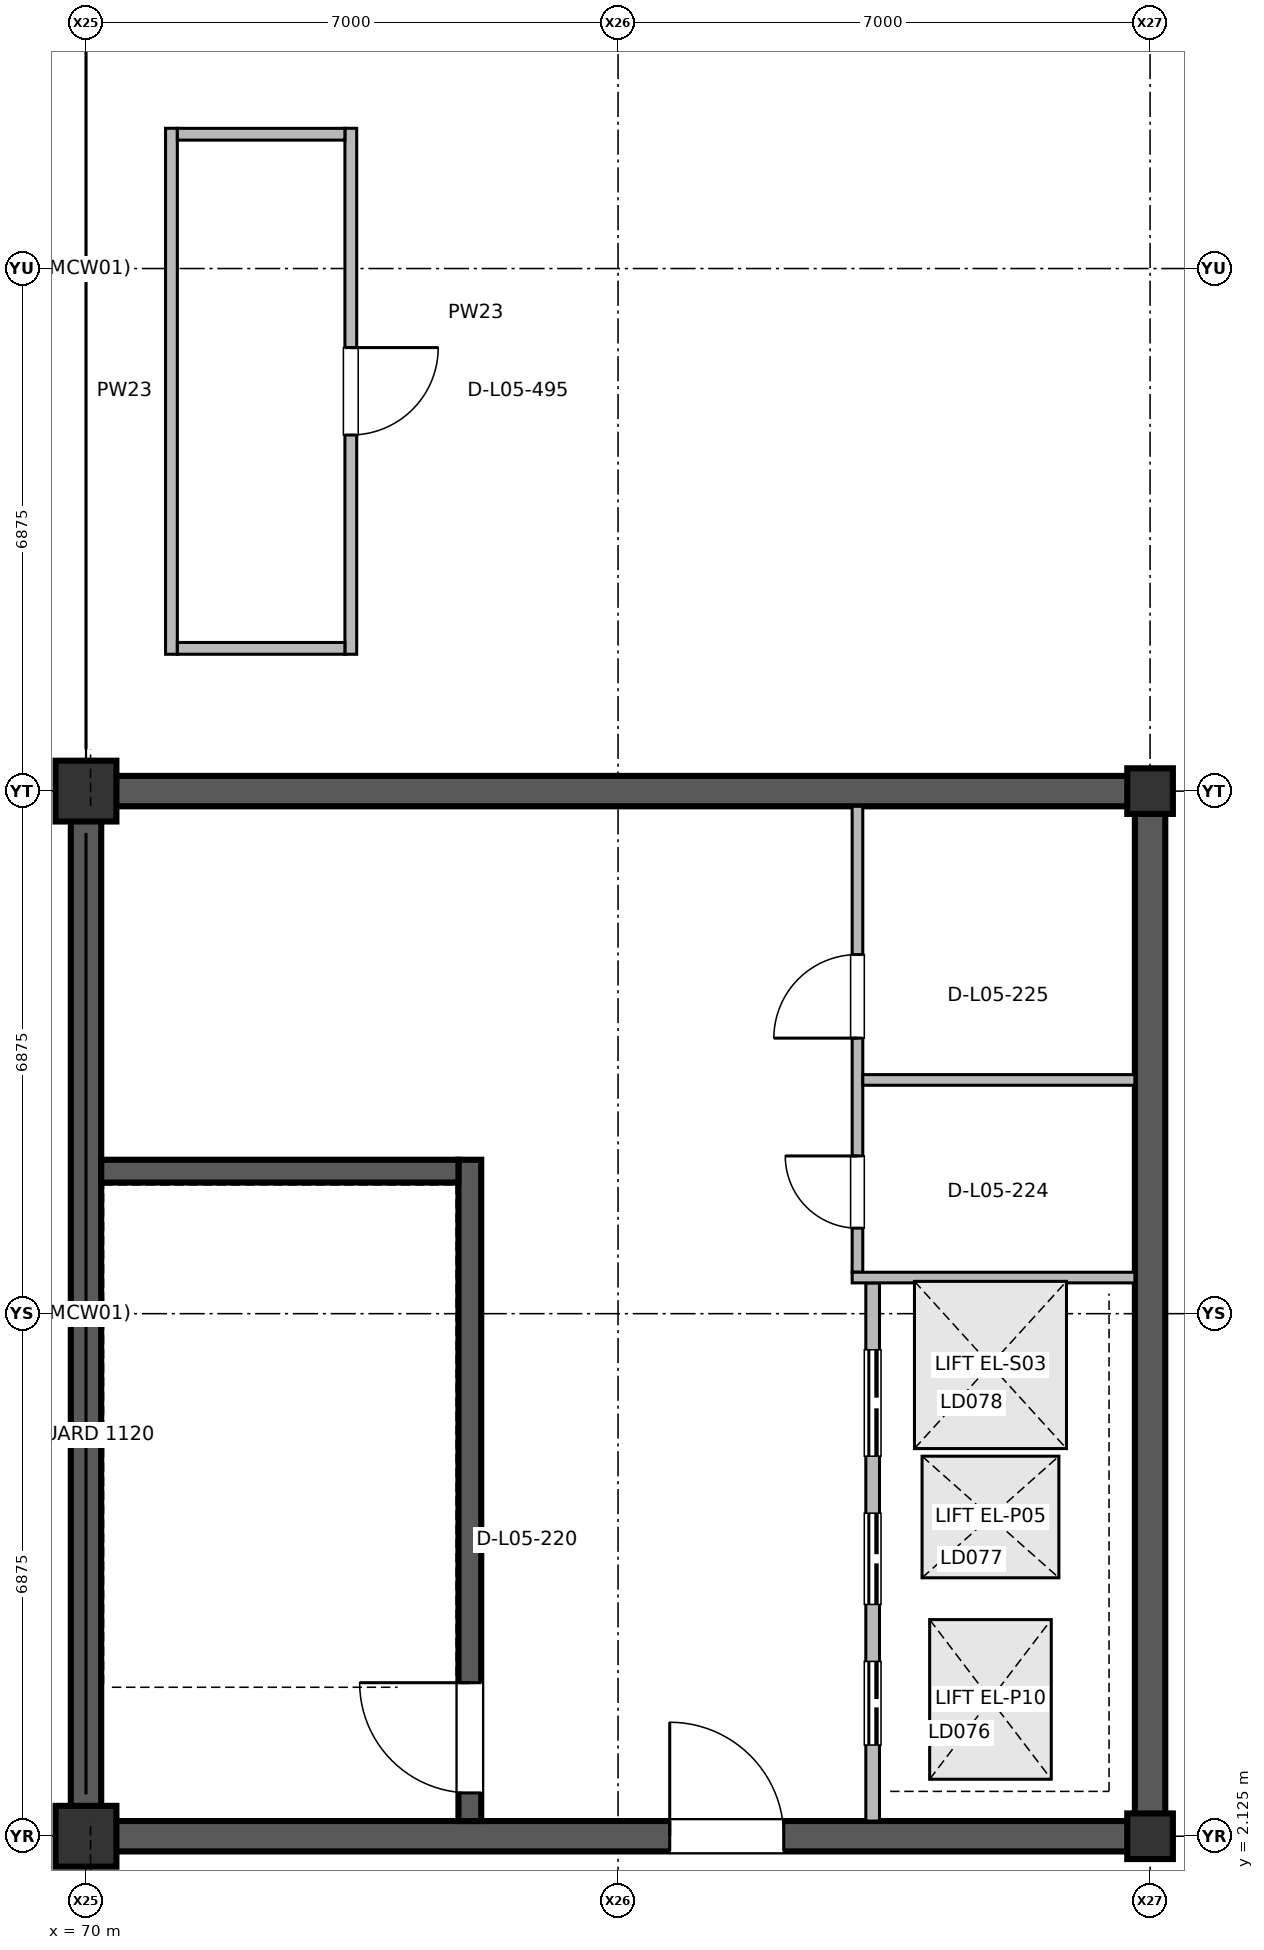
"""IFC4 building model, lengths in metres.
Left out: names, types, materials, properties, quantities, classifications, styles, units other than length and angle.
Written with IfcOpenShell. Run it as: python <this file> out.ifc"""

import sys

from ifc_helpers import new_model, si_unit, direction, frame, frame_2d, origin, origin_2d, place, context, subcontext, project, spatial, rectangle, extrude, element, fill, save


model = new_model("IFC4")
c1 = context("Model", 3, precision=1e-05, world=origin(), true_north=direction((0.0, 1.0)))
c2 = subcontext(c1, "Body", "Model", "MODEL_VIEW")
j1 = project(units=[si_unit("LENGTHUNIT", "METRE"), si_unit("PLANEANGLEUNIT", "RADIAN")], contexts=[c1])
p1 = place(None, origin())
s1 = spatial("IfcSite", under=j1, at=p1, CompositionType="ELEMENT")
p2 = place(p1, origin())
s2 = spatial("IfcBuilding", under=s1, at=p2, CompositionType="ELEMENT")
p3 = place(p2, frame((0.0, 0.0, 21.0)))
s3 = spatial("IfcBuildingStorey", under=s2, at=p3, CompositionType="ELEMENT", Elevation=21.0)
for number, where, z_axis, x_axis in (
    (1, (70.0, 2.125, 0.0), (0.0, 0.0, 1.0), (1.0, 0.0, 0.0)),
    (2, (70.0, 15.875, 0.0), (0.0, 0.0, 1.0), (1.0, 0.0, 0.0)),
):
    element("IfcColumn", number, at=place(p3, frame(where, z_axis=z_axis, x_axis=x_axis)), inside=s3, PredefinedType="COLUMN", context=c2, shape_type="SweptSolid", body=[
        extrude(rectangle(XDim=0.8, YDim=0.8, at=origin_2d()), origin(), (0.0, 0.0, 1.0), 5.185),
    ])
for number, where, z_axis, x_axis in (
    (3, (84.0, 2.125, 0.0), (0.0, 0.0, 1.0), (1.0, 0.0, 0.0)),
    (4, (84.0, 15.875, 0.0), (0.0, 0.0, 1.0), (1.0, 0.0, 0.0)),
):
    element("IfcColumn", number, at=place(p3, frame(where, z_axis=z_axis, x_axis=x_axis)), inside=s3, PredefinedType="COLUMN", context=c2, shape_type="SweptSolid", body=[
        extrude(rectangle(XDim=0.6, YDim=0.6, at=origin_2d()), origin(), (0.0, 0.0, 1.0), 5.185),
    ])
for number, where, z_axis, x_axis in (
    (5, (70.0, 2.325, 0.0), (0.0, 0.0, 1.0), (0.0, 1.0, 0.0)),
    (6, (84.0, 2.325, 0.0), (0.0, 0.0, 1.0), (0.0, 1.0, 0.0)),
):
    element("IfcWall", number, at=place(p3, frame(where, z_axis=z_axis, x_axis=x_axis)), inside=s3, PredefinedType="SHEAR", context=c2, shape_type="SweptSolid", body=[
        extrude(rectangle(XDim=13.35, YDim=0.4, at=frame_2d((6.675, 0.0))), origin(), (0.0, 0.0, 1.0), 5.185),
    ])
p4 = place(p3, frame((70.2, 2.125, 0.0), z_axis=(0.0, 0.0, 1.0), x_axis=(1.0, 0.0, 0.0)))
e7 = element("IfcWall", 7, at=p4, inside=s3, PredefinedType="SHEAR", context=c2, shape_type="SweptSolid", body=[
    extrude(rectangle(XDim=13.6, YDim=0.4, at=frame_2d((6.8, 0.0))), origin(), (0.0, 0.0, 1.0), 5.185),
])
p5 = place(p4, frame((7.48, 0.0, 0.0)))
e8 = element("IfcOpeningElement", 8, at=p5, cuts=e7, PredefinedType="OPENING", context=c2, shape_type="SweptSolid", body=[
    extrude(rectangle(XDim=1.5, YDim=2.2, at=frame_2d((0.75, 1.1))), frame((0.0, 0.21, 0.0), z_axis=(0.0, -1.0, 0.0), x_axis=(1.0, 0.0, 0.0)), (0.0, 0.0, 1.0), 0.42),
])
p6 = place(p3, frame((70.2, 15.875, 0.0), z_axis=(0.0, 0.0, 1.0), x_axis=(1.0, 0.0, 0.0)))
e9 = element("IfcWall", 9, at=p6, inside=s3, PredefinedType="SHEAR", context=c2, shape_type="SweptSolid", body=[
    extrude(rectangle(XDim=13.6, YDim=0.4, at=frame_2d((6.8, 0.0))), origin(), (0.0, 0.0, 1.0), 5.185),
])
p7 = place(p3, frame((75.05, 2.325, 0.0), z_axis=(0.0, 0.0, 1.0), x_axis=(0.0, 1.0, 0.0)))
e10 = element("IfcWall", 10, at=p7, inside=s3, PredefinedType="SHEAR", context=c2, shape_type="SweptSolid", body=[
    extrude(rectangle(XDim=8.7, YDim=0.3, at=frame_2d((4.35, 0.0))), origin(), (0.0, 0.0, 1.0), 5.185),
])
p8 = place(p7, frame((0.37, 0.0, 0.0)))
e11 = element("IfcOpeningElement", 11, at=p8, cuts=e10, PredefinedType="OPENING", context=c2, shape_type="SweptSolid", body=[
    extrude(rectangle(XDim=1.45, YDim=2.2, at=frame_2d((0.725, 1.1))), frame((0.0, 0.16, 0.0), z_axis=(0.0, -1.0, 0.0), x_axis=(1.0, 0.0, 0.0)), (0.0, 0.0, 1.0), 0.32),
])
p9 = place(p3, frame((80.35, 2.325, 0.0), z_axis=(0.0, 0.0, 1.0), x_axis=(0.0, 1.0, 0.0)))
e12 = element("IfcWall", 12, at=p9, inside=s3, PredefinedType="PARTITIONING", context=c2, shape_type="SweptSolid", body=[
    extrude(rectangle(XDim=7.08, YDim=0.18, at=frame_2d((3.54, 0.0))), origin(), (0.0, 0.0, 1.0), 4.42),
])
p10 = place(p9, frame((1.0, 0.0, 0.0)))
e13 = element("IfcOpeningElement", 13, at=p10, cuts=e12, PredefinedType="OPENING", context=c2, shape_type="SweptSolid", body=[
    extrude(rectangle(XDim=1.1, YDim=2.2, at=frame_2d((0.55, 1.1))), frame((0.0, 0.1, 0.0), z_axis=(0.0, -1.0, 0.0), x_axis=(1.0, 0.0, 0.0)), (0.0, 0.0, 1.0), 0.2),
])
p11 = place(p9, frame((2.85, 0.0, 0.0)))
e14 = element("IfcOpeningElement", 14, at=p11, cuts=e12, PredefinedType="OPENING", context=c2, shape_type="SweptSolid", body=[
    extrude(rectangle(XDim=1.2, YDim=2.25, at=frame_2d((0.6, 1.125))), frame((0.0, 0.1, 0.0), z_axis=(0.0, -1.0, 0.0), x_axis=(1.0, 0.0, 0.0)), (0.0, 0.0, 1.0), 0.2),
])
p12 = place(p9, frame((4.8, 0.0, 0.0)))
e15 = element("IfcOpeningElement", 15, at=p12, cuts=e12, PredefinedType="OPENING", context=c2, shape_type="SweptSolid", body=[
    extrude(rectangle(XDim=1.4, YDim=2.3, at=frame_2d((0.7, 1.15))), frame((0.0, 0.1, 0.0), z_axis=(0.0, -1.0, 0.0), x_axis=(1.0, 0.0, 0.0)), (0.0, 0.0, 1.0), 0.2),
])
p13 = place(p3, frame((80.15, 9.545, 0.0), z_axis=(0.0, 0.0, 1.0), x_axis=(0.0, 1.0, 0.0)))
e16 = element("IfcWall", 16, at=p13, inside=s3, PredefinedType="PARTITIONING", context=c2, shape_type="SweptSolid", body=[
    extrude(rectangle(XDim=6.13, YDim=0.14, at=frame_2d((3.065, 0.0))), origin(), (0.0, 0.0, 1.0), 4.42),
])
p14 = place(p13, frame((0.58, 0.0, 0.0)))
e17 = element("IfcOpeningElement", 17, at=p14, cuts=e16, PredefinedType="OPENING", context=c2, shape_type="SweptSolid", body=[
    extrude(rectangle(XDim=0.95, YDim=2.15, at=frame_2d((0.475, 1.075))), frame((0.0, 0.08, 0.0), z_axis=(0.0, -1.0, 0.0), x_axis=(1.0, 0.0, 0.0)), (0.0, 0.0, 1.0), 0.16),
])
p15 = place(p13, frame((3.08, 0.0, 0.0)))
e18 = element("IfcOpeningElement", 18, at=p15, cuts=e16, PredefinedType="OPENING", context=c2, shape_type="SweptSolid", body=[
    extrude(rectangle(XDim=1.1, YDim=2.15, at=frame_2d((0.55, 1.075))), frame((0.0, 0.08, 0.0), z_axis=(0.0, -1.0, 0.0), x_axis=(1.0, 0.0, 0.0)), (0.0, 0.0, 1.0), 0.16),
])
p16 = place(p3, frame((73.484, 24.595, 0.0), z_axis=(0.0, 0.0, 1.0), x_axis=(0.0, -1.0, 0.0)))
e19 = element("IfcWall", 19, at=p16, inside=s3, PredefinedType="PARTITIONING", context=c2, shape_type="SweptSolid", body=[
    extrude(rectangle(XDim=6.92, YDim=0.155, at=frame_2d((3.46, 0.0))), origin(), (0.0, 0.0, 1.0), 4.42),
])
p17 = place(p16, frame((2.885, 0.0, 0.0)))
e20 = element("IfcOpeningElement", 20, at=p17, cuts=e19, PredefinedType="OPENING", context=c2, shape_type="SweptSolid", body=[
    extrude(rectangle(XDim=1.15, YDim=2.2, at=frame_2d((0.575, 1.1))), frame((0.0, 0.087, 0.0), z_axis=(0.0, -1.0, 0.0), x_axis=(1.0, 0.0, 0.0)), (0.0, 0.0, 1.0), 0.175),
])
p18 = place(p3, frame((80.08, 9.475, 0.0), z_axis=(0.0, 0.0, 1.0), x_axis=(1.0, 0.0, 0.0)))
e21 = element("IfcWall", 21, at=p18, inside=s3, PredefinedType="PARTITIONING", context=c2, shape_type="SweptSolid", body=[
    extrude(rectangle(XDim=3.72, YDim=0.14, at=frame_2d((1.86, 0.0))), origin(), (0.0, 0.0, 1.0), 4.42),
])
p19 = place(p3, frame((80.22, 12.075, 0.0), z_axis=(0.0, 0.0, 1.0), x_axis=(1.0, 0.0, 0.0)))
e22 = element("IfcWall", 22, at=p19, inside=s3, PredefinedType="PARTITIONING", context=c2, shape_type="SweptSolid", body=[
    extrude(rectangle(XDim=3.58, YDim=0.14, at=frame_2d((1.79, 0.0))), origin(), (0.0, 0.0, 1.0), 4.42),
])
p20 = place(p3, frame((71.124, 17.675, 0.0), z_axis=(0.0, 0.0, 1.0), x_axis=(0.0, 1.0, 0.0)))
e23 = element("IfcWall", 23, at=p20, inside=s3, PredefinedType="PARTITIONING", context=c2, shape_type="SweptSolid", body=[
    extrude(rectangle(XDim=6.92, YDim=0.155, at=frame_2d((3.46, 0.0))), origin(), (0.0, 0.0, 1.0), 4.42),
])
for number, where, z_axis, x_axis in (
    (24, (71.202, 17.753, 0.0), (0.0, 0.0, 1.0), (1.0, 0.0, 0.0)),
    (25, (71.202, 24.517, 0.0), (0.0, 0.0, 1.0), (1.0, 0.0, 0.0)),
):
    element("IfcWall", number, at=place(p3, frame(where, z_axis=z_axis, x_axis=x_axis)), inside=s3, PredefinedType="PARTITIONING", context=c2, shape_type="SweptSolid", body=[
        extrude(rectangle(XDim=2.204, YDim=0.155, at=frame_2d((1.102, 0.0))), origin(), (0.0, 0.0, 1.0), 4.42),
    ])
p21 = place(p3, frame((70.2, 10.875, 0.0), z_axis=(0.0, 0.0, 1.0), x_axis=(1.0, 0.0, 0.0)))
e26 = element("IfcWall", 26, at=p21, inside=s3, PredefinedType="SHEAR", context=c2, shape_type="SweptSolid", body=[
    extrude(rectangle(XDim=4.7, YDim=0.3, at=frame_2d((2.35, 0.0))), origin(), (0.0, 0.0, 1.0), 5.185),
])
p22 = place(p5, origin())
e27 = element("IfcDoor", 27, at=p22, inside=s3, OperationType="SINGLE_SWING_LEFT", PredefinedType="DOOR", context=c2, shape_type="SweptSolid", body=[
    extrude(rectangle(XDim=1.5, YDim=2.2, at=frame_2d((0.75, 1.1))), frame((0.0, 0.025, 0.0), z_axis=(0.0, -1.0, 0.0), x_axis=(1.0, 0.0, 0.0)), (0.0, 0.0, 1.0), 0.05),
])
fill(e8, e27)
p23 = place(p8, origin())
e28 = element("IfcDoor", 28, at=p23, inside=s3, OperationType="SINGLE_SWING_RIGHT", PredefinedType="DOOR", context=c2, shape_type="SweptSolid", body=[
    extrude(rectangle(XDim=1.45, YDim=2.2, at=frame_2d((0.725, 1.1))), frame((0.0, 0.025, 0.0), z_axis=(0.0, -1.0, 0.0), x_axis=(1.0, 0.0, 0.0)), (0.0, 0.0, 1.0), 0.05),
])
fill(e11, e28)
p24 = place(p10, origin())
e29 = element("IfcDoor", 29, at=p24, inside=s3, OperationType="DOUBLE_DOOR_SLIDING", PredefinedType="DOOR", context=c2, shape_type="SweptSolid", body=[
    extrude(rectangle(XDim=1.1, YDim=2.2, at=frame_2d((0.55, 1.1))), frame((0.0, 0.025, 0.0), z_axis=(0.0, -1.0, 0.0), x_axis=(1.0, 0.0, 0.0)), (0.0, 0.0, 1.0), 0.05),
])
fill(e13, e29)
p25 = place(p11, origin())
e30 = element("IfcDoor", 30, at=p25, inside=s3, OperationType="DOUBLE_DOOR_SLIDING", PredefinedType="DOOR", context=c2, shape_type="SweptSolid", body=[
    extrude(rectangle(XDim=1.2, YDim=2.25, at=frame_2d((0.6, 1.125))), frame((0.0, 0.025, 0.0), z_axis=(0.0, -1.0, 0.0), x_axis=(1.0, 0.0, 0.0)), (0.0, 0.0, 1.0), 0.05),
])
fill(e14, e30)
p26 = place(p12, origin())
e31 = element("IfcDoor", 31, at=p26, inside=s3, OperationType="DOUBLE_DOOR_SLIDING", PredefinedType="DOOR", context=c2, shape_type="SweptSolid", body=[
    extrude(rectangle(XDim=1.4, YDim=2.3, at=frame_2d((0.7, 1.15))), frame((0.0, 0.025, 0.0), z_axis=(0.0, -1.0, 0.0), x_axis=(1.0, 0.0, 0.0)), (0.0, 0.0, 1.0), 0.05),
])
fill(e15, e31)
p27 = place(p14, origin())
e32 = element("IfcDoor", 32, at=p27, inside=s3, OperationType="SINGLE_SWING_RIGHT", PredefinedType="DOOR", context=c2, shape_type="SweptSolid", body=[
    extrude(rectangle(XDim=0.95, YDim=2.15, at=frame_2d((0.475, 1.075))), frame((0.0, 0.025, 0.0), z_axis=(0.0, -1.0, 0.0), x_axis=(1.0, 0.0, 0.0)), (0.0, 0.0, 1.0), 0.05),
])
fill(e17, e32)
p28 = place(p15, origin())
e33 = element("IfcDoor", 33, at=p28, inside=s3, OperationType="SINGLE_SWING_LEFT", PredefinedType="DOOR", context=c2, shape_type="SweptSolid", body=[
    extrude(rectangle(XDim=1.1, YDim=2.15, at=frame_2d((0.55, 1.075))), frame((0.0, 0.025, 0.0), z_axis=(0.0, -1.0, 0.0), x_axis=(1.0, 0.0, 0.0)), (0.0, 0.0, 1.0), 0.05),
])
fill(e18, e33)
p29 = place(p17, origin())
e34 = element("IfcDoor", 34, at=p29, inside=s3, OperationType="SINGLE_SWING_LEFT", PredefinedType="DOOR", context=c2, shape_type="SweptSolid", body=[
    extrude(rectangle(XDim=1.15, YDim=2.2, at=frame_2d((0.575, 1.1))), frame((0.0, 0.025, 0.0), z_axis=(0.0, -1.0, 0.0), x_axis=(1.0, 0.0, 0.0)), (0.0, 0.0, 1.0), 0.05),
])
fill(e20, e34)
save(model, sys.argv[1])
